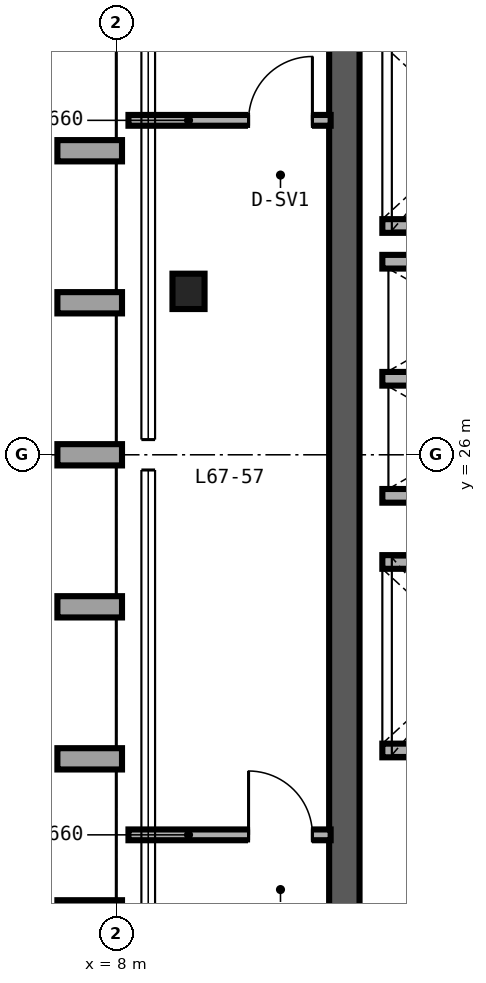
"""IFC4 building model, lengths in metres.
Left out: names, types, materials, properties, quantities, classifications, styles, units other than length and angle.
Written with IfcOpenShell. Run it as: python <this file> out.ifc"""

import sys

from ifc_helpers import new_model, si_unit, direction, frame, frame_2d, origin, origin_2d, place, context, subcontext, project, spatial, rectangle, i_section, extrude, source, transform, mapped, element, fill, save


model = new_model("IFC4")
c1 = context("Model", 3, precision=1e-05, world=origin(), true_north=direction((0.0, 1.0)))
c2 = subcontext(c1, "Body", "Model", "MODEL_VIEW")
j1 = project(units=[si_unit("LENGTHUNIT", "METRE"), si_unit("PLANEANGLEUNIT", "RADIAN")], contexts=[c1])
p1 = place(None, origin())
s1 = spatial("IfcSite", under=j1, at=p1, CompositionType="ELEMENT")
p2 = place(p1, origin())
s2 = spatial("IfcBuilding", under=s1, at=p2, CompositionType="ELEMENT")
p3 = place(p2, frame((0.0, 0.0, 265.2)))
s3 = spatial("IfcBuildingStorey", under=s2, at=p3, CompositionType="ELEMENT", Elevation=265.2)
p4 = place(p3, frame((11.0, 15.2, 0.0), z_axis=(0.0, 0.0, 1.0), x_axis=(0.0, 1.0, 0.0)))
e1 = element("IfcWall", 1, at=p4, inside=s3, PredefinedType="SHEAR", context=c2, shape_type="SweptSolid", body=[
    extrude(rectangle(XDim=21.6, YDim=0.4, at=frame_2d((10.8, 0.0))), origin(), (0.0, 0.0, 1.0), 3.38),
])
m1 = source(origin(), c2, "Body", "SweptSolid", [
    extrude(i_section(OverallWidth=0.422, OverallDepth=0.465, WebThickness=0.045, FlangeThickness=0.073, FilletRadius=0.025, at=origin_2d()), origin(), (0.0, 0.0, 1.0), 3.38),
])
p5 = place(p3, frame((8.95, 28.15, 0.0), z_axis=(0.0, 0.0, 1.0), x_axis=(1.0, 0.0, 0.0)))
e2 = element("IfcColumn", 2, at=p5, inside=s3, PredefinedType="COLUMN", context=c2, shape_type="MappedRepresentation", body=[
    mapped(m1, transform((0.0, 0.0, 0.0), scale=1.0)),
])
for number, where, z_axis, x_axis in (
    (3, (11.5, 22.11, 0.0), (0.0, 0.0, 1.0), (1.0, 0.0, 0.0)),
    (4, (11.5, 24.59, 0.0), (0.0, 0.0, 1.0), (1.0, 0.0, 0.0)),
    (5, (11.5, 29.01, 0.0), (0.0, 0.0, 1.0), (1.0, 0.0, 0.0)),
):
    element("IfcWall", number, at=place(p3, frame(where, z_axis=z_axis, x_axis=x_axis)), inside=s3, PredefinedType="SOLIDWALL", context=c2, shape_type="SweptSolid", body=[
        extrude(rectangle(XDim=2.5, YDim=0.18, at=frame_2d((1.25, 0.0))), origin(), (0.0, 0.0, 1.0), 3.38),
    ])
for number, where, z_axis, x_axis in (
    (6, (11.5, 25.46, 0.0), (0.0, 0.0, 1.0), (1.0, 0.0, 0.0)),
    (7, (11.5, 27.0, 0.0), (0.0, 0.0, 1.0), (1.0, 0.0, 0.0)),
    (8, (11.5, 28.54, 0.0), (0.0, 0.0, 1.0), (1.0, 0.0, 0.0)),
):
    element("IfcWall", number, at=place(p3, frame(where, z_axis=z_axis, x_axis=x_axis)), inside=s3, PredefinedType="SOLIDWALL", context=c2, shape_type="SweptSolid", body=[
        extrude(rectangle(XDim=2.51, YDim=0.18, at=frame_2d((1.255, 0.0))), origin(), (0.0, 0.0, 1.0), 3.38),
    ])
p6 = place(p3, frame((8.16, 21.0, 0.0), z_axis=(0.0, 0.0, 1.0), x_axis=(1.0, 0.0, 0.0)))
e9 = element("IfcWall", 9, at=p6, inside=s3, PredefinedType="PARTITIONING", context=c2, shape_type="SweptSolid", body=[
    extrude(rectangle(XDim=2.66, YDim=0.142, at=frame_2d((1.33, 0.0))), origin(), (0.0, 0.0, 1.0), 2.48),
])
p7 = place(p6, frame((1.58, 0.0, 0.0)))
e10 = element("IfcOpeningElement", 10, at=p7, cuts=e9, PredefinedType="OPENING", context=c2, shape_type="SweptSolid", body=[
    extrude(rectangle(XDim=0.84, YDim=2.1, at=frame_2d((0.42, 1.05))), frame((0.0, 0.081, 0.0), z_axis=(0.0, -1.0, 0.0), x_axis=(1.0, 0.0, 0.0)), (0.0, 0.0, 1.0), 0.162),
])
p8 = place(p3, frame((8.16, 30.4, 0.0), z_axis=(0.0, 0.0, 1.0), x_axis=(1.0, 0.0, 0.0)))
e11 = element("IfcWall", 11, at=p8, inside=s3, PredefinedType="PARTITIONING", context=c2, shape_type="SweptSolid", body=[
    extrude(rectangle(XDim=2.66, YDim=0.142, at=frame_2d((1.33, 0.0))), origin(), (0.0, 0.0, 1.0), 2.763),
])
p9 = place(p8, frame((1.58, 0.0, 0.0)))
e12 = element("IfcOpeningElement", 12, at=p9, cuts=e11, PredefinedType="OPENING", context=c2, shape_type="SweptSolid", body=[
    extrude(rectangle(XDim=0.84, YDim=2.1, at=frame_2d((0.42, 1.05))), frame((0.0, 0.081, 0.0), z_axis=(0.0, -1.0, 0.0), x_axis=(1.0, 0.0, 0.0)), (0.0, 0.0, 1.0), 0.162),
])
m2 = source(origin(), c2, "Body", "SweptSolid", [
    extrude(rectangle(XDim=0.84, YDim=2.1, at=frame_2d((0.42, 1.05))), frame((0.0, 0.025, 0.0), z_axis=(0.0, -1.0, 0.0), x_axis=(1.0, 0.0, 0.0)), (0.0, 0.0, 1.0), 0.05),
])
p10 = place(p7, origin())
e13 = element("IfcDoor", 13, at=p10, inside=s3, OperationType="SINGLE_SWING_LEFT", PredefinedType="DOOR", context=c2, shape_type="MappedRepresentation", body=[
    mapped(m2, transform((0.0, 0.0, 0.0), scale=1.0)),
])
fill(e10, e13)
p11 = place(p9, origin())
e14 = element("IfcDoor", 14, at=p11, inside=s3, OperationType="SINGLE_SWING_RIGHT", PredefinedType="DOOR", context=c2, shape_type="MappedRepresentation", body=[
    mapped(m2, transform((0.0, 0.0, 0.0), scale=1.0)),
])
fill(e12, e14)
save(model, sys.argv[1])
